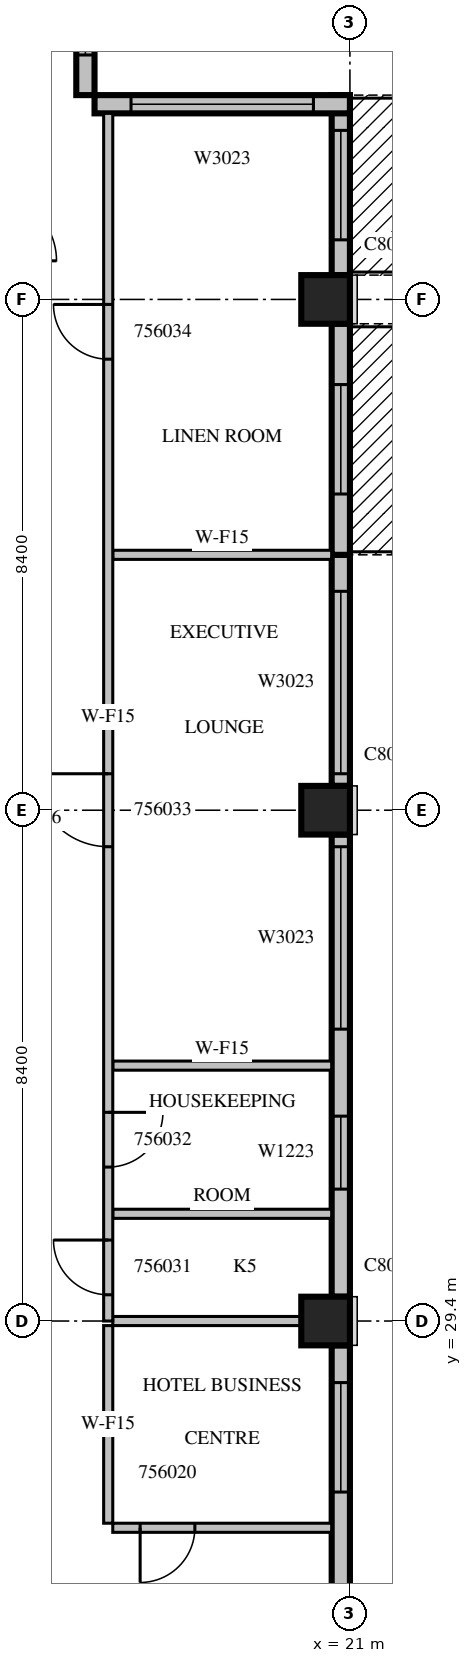
"""IFC4 building model, lengths in metres.
Left out: names, types, materials, properties, quantities, classifications, styles, units other than length and angle.
Written with IfcOpenShell. Run it as: python <this file> out.ifc"""

import sys

from ifc_helpers import new_model, si_unit, direction, frame, frame_2d, origin, origin_2d, place, context, subcontext, project, spatial, rectangle, extrude, source, transform, mapped, element, fill, save


model = new_model("IFC4")
c1 = context("Model", 3, precision=1e-05, world=origin(), true_north=direction((0.0, 1.0)))
c2 = subcontext(c1, "Body", "Model", "MODEL_VIEW")
j1 = project(units=[si_unit("LENGTHUNIT", "METRE"), si_unit("PLANEANGLEUNIT", "RADIAN")], contexts=[c1])
p1 = place(None, origin())
s1 = spatial("IfcSite", under=j1, at=p1, CompositionType="ELEMENT")
p2 = place(p1, origin())
s2 = spatial("IfcBuilding", under=s1, at=p2, CompositionType="ELEMENT")
p3 = place(p2, frame((0.0, 0.0, 246.2)))
s3 = spatial("IfcBuildingStorey", under=s2, at=p3, CompositionType="ELEMENT", Elevation=246.2)
m1 = source(origin(), c2, "Body", "SweptSolid", [
    extrude(rectangle(XDim=0.8, YDim=0.8, at=origin_2d()), origin(), (0.0, 0.0, 1.0), 3.8),
])
for number, where, z_axis, x_axis in (
    (1, (20.6, 29.4, 0.0), (0.0, 0.0, 1.0), (1.0, 0.0, 0.0)),
    (2, (20.6, 37.8, 0.0), (0.0, 0.0, 1.0), (1.0, 0.0, 0.0)),
    (3, (20.6, 46.2, 0.0), (0.0, 0.0, 1.0), (1.0, 0.0, 0.0)),
):
    element("IfcColumn", number, at=place(p3, frame(where, z_axis=z_axis, x_axis=x_axis)), inside=s3, PredefinedType="COLUMN", context=c2, shape_type="MappedRepresentation", body=[
        mapped(m1, transform((0.0, 0.0, 0.0), scale=1.0)),
    ])
m2 = source(origin(), c2, "Body", "SweptSolid", [
    extrude(rectangle(XDim=7.2, YDim=0.3, at=frame_2d((3.6, 0.0))), origin(), (0.0, 0.0, 1.0), 3.4),
])
p4 = place(p3, frame((20.85, 21.8, 0.0), z_axis=(0.0, 0.0, 1.0), x_axis=(0.0, 1.0, 0.0)))
e4 = element("IfcWall", 4, at=p4, inside=s3, PredefinedType="STANDARD", context=c2, shape_type="MappedRepresentation", body=[
    mapped(m2, transform((0.0, 0.0, 0.0), scale=1.0)),
])
m3 = source(origin(), c2, "Body", "SweptSolid", [
    extrude(rectangle(XDim=1.8, YDim=2.3, at=frame_2d((0.9, 1.15))), frame((0.0, 0.16, 0.0), z_axis=(0.0, -1.0, 0.0), x_axis=(1.0, 0.0, 0.0)), (0.0, 0.0, 1.0), 0.32),
])
p5 = place(p4, frame((0.4, 0.0, 0.6)))
e5 = element("IfcOpeningElement", 5, at=p5, cuts=e4, PredefinedType="OPENING", context=c2, shape_type="MappedRepresentation", body=[
    mapped(m3, transform((0.0, 0.0, 0.0), scale=1.0)),
])
p6 = place(p4, frame((4.787, 0.0, 0.6)))
e6 = element("IfcOpeningElement", 6, at=p6, cuts=e4, PredefinedType="OPENING", context=c2, shape_type="MappedRepresentation", body=[
    mapped(m3, transform((0.0, 0.0, 0.0), scale=1.0)),
])
m4 = source(origin(), c2, "Body", "SweptSolid", [
    extrude(rectangle(XDim=7.6, YDim=0.3, at=frame_2d((3.8, 0.0))), origin(), (0.0, 0.0, 1.0), 3.4),
])
p7 = place(p3, frame((20.85, 29.8, 0.0), z_axis=(0.0, 0.0, 1.0), x_axis=(0.0, 1.0, 0.0)))
e7 = element("IfcWall", 7, at=p7, inside=s3, PredefinedType="STANDARD", context=c2, shape_type="MappedRepresentation", body=[
    mapped(m4, transform((0.0, 0.0, 0.0), scale=1.0)),
])
m5 = source(origin(), c2, "Body", "SweptSolid", [
    extrude(rectangle(XDim=1.2, YDim=2.3, at=frame_2d((0.6, 1.15))), frame((0.0, 0.16, 0.0), z_axis=(0.0, -1.0, 0.0), x_axis=(1.0, 0.0, 0.0)), (0.0, 0.0, 1.0), 0.32),
])
p8 = place(p7, frame((1.769, 0.0, 0.6)))
e8 = element("IfcOpeningElement", 8, at=p8, cuts=e7, PredefinedType="OPENING", context=c2, shape_type="MappedRepresentation", body=[
    mapped(m5, transform((0.0, 0.0, 0.0), scale=1.0)),
])
m6 = source(origin(), c2, "Body", "SweptSolid", [
    extrude(rectangle(XDim=3.0, YDim=2.3, at=frame_2d((1.5, 1.15))), frame((0.0, 0.16, 0.0), z_axis=(0.0, -1.0, 0.0), x_axis=(1.0, 0.0, 0.0)), (0.0, 0.0, 1.0), 0.32),
])
p9 = place(p7, frame((4.4, 0.0, 0.6)))
e9 = element("IfcOpeningElement", 9, at=p9, cuts=e7, PredefinedType="OPENING", context=c2, shape_type="MappedRepresentation", body=[
    mapped(m6, transform((0.0, 0.0, 0.0), scale=1.0)),
])
m7 = source(origin(), c2, "Body", "SweptSolid", [
    extrude(rectangle(XDim=3.8, YDim=0.3, at=frame_2d((1.9, 0.0))), origin(), (0.0, 0.0, 1.0), 3.4),
])
p10 = place(p3, frame((20.85, 38.2, 0.0), z_axis=(0.0, 0.0, 1.0), x_axis=(0.0, 1.0, 0.0)))
e10 = element("IfcWall", 10, at=p10, inside=s3, PredefinedType="STANDARD", context=c2, shape_type="MappedRepresentation", body=[
    mapped(m7, transform((0.0, 0.0, 0.0), scale=1.0)),
])
p11 = place(p10, frame((0.2, 0.0, 0.6)))
e11 = element("IfcOpeningElement", 11, at=p11, cuts=e10, PredefinedType="OPENING", context=c2, shape_type="MappedRepresentation", body=[
    mapped(m6, transform((0.0, 0.0, 0.0), scale=1.0)),
])
p12 = place(p3, frame((20.85, 42.0, 0.0), z_axis=(0.0, 0.0, 1.0), x_axis=(0.0, 1.0, 0.0)))
e12 = element("IfcWall", 12, at=p12, inside=s3, PredefinedType="STANDARD", context=c2, shape_type="MappedRepresentation", body=[
    mapped(m7, transform((0.0, 0.0, 0.0), scale=1.0)),
])
m8 = source(origin(), c2, "Body", "SweptSolid", [
    extrude(rectangle(XDim=1.8, YDim=2.4, at=frame_2d((0.9, 1.2))), frame((0.0, 0.16, 0.0), z_axis=(0.0, -1.0, 0.0), x_axis=(1.0, 0.0, 0.0)), (0.0, 0.0, 1.0), 0.32),
])
p13 = place(p12, frame((1.0, 0.0, 0.0)))
e13 = element("IfcOpeningElement", 13, at=p13, cuts=e12, PredefinedType="OPENING", context=c2, shape_type="MappedRepresentation", body=[
    mapped(m8, transform((0.0, 0.0, 0.0), scale=1.0)),
])
m9 = source(origin(), c2, "Body", "SweptSolid", [
    extrude(rectangle(XDim=2.96, YDim=0.3, at=frame_2d((1.48, 0.0))), origin(), (0.0, 0.0, 1.0), 3.4),
])
p14 = place(p3, frame((20.85, 46.6, 0.0), z_axis=(0.0, 0.0, 1.0), x_axis=(0.0, 1.0, 0.0)))
e14 = element("IfcWall", 14, at=p14, inside=s3, PredefinedType="STANDARD", context=c2, shape_type="MappedRepresentation", body=[
    mapped(m9, transform((0.0, 0.0, 0.0), scale=1.0)),
])
p15 = place(p14, frame((0.58, 0.0, 0.0)))
e15 = element("IfcOpeningElement", 15, at=p15, cuts=e14, PredefinedType="OPENING", context=c2, shape_type="MappedRepresentation", body=[
    mapped(m8, transform((0.0, 0.0, 0.0), scale=1.0)),
])
m10 = source(origin(), c2, "Body", "SweptSolid", [
    extrude(rectangle(XDim=4.2, YDim=0.3, at=frame_2d((2.1, 0.0))), origin(), (0.0, 0.0, 1.0), 3.4),
])
p16 = place(p3, frame((21.0, 49.41, 0.0), z_axis=(0.0, 0.0, 1.0), x_axis=(-1.0, 0.0, 0.0)))
e16 = element("IfcWall", 16, at=p16, inside=s3, PredefinedType="STANDARD", context=c2, shape_type="MappedRepresentation", body=[
    mapped(m10, transform((0.0, 0.0, 0.0), scale=1.0)),
])
p17 = place(p16, frame((0.6, 0.0, 0.6)))
e17 = element("IfcOpeningElement", 17, at=p17, cuts=e16, PredefinedType="OPENING", context=c2, shape_type="MappedRepresentation", body=[
    mapped(m6, transform((0.0, 0.0, 0.0), scale=1.0)),
])
m11 = source(origin(), c2, "Body", "SweptSolid", [
    extrude(rectangle(XDim=2.52, YDim=0.3, at=frame_2d((1.26, 0.0))), origin(), (0.0, 0.0, 1.0), 3.4),
])
p18 = place(p3, frame((16.65, 49.56, 0.0), z_axis=(0.0, 0.0, 1.0), x_axis=(0.0, 1.0, 0.0)))
e18 = element("IfcWall", 18, at=p18, inside=s3, PredefinedType="STANDARD", context=c2, shape_type="MappedRepresentation", body=[
    mapped(m11, transform((0.0, 0.0, 0.0), scale=1.0)),
])
p19 = place(p18, frame((0.66, 0.0, 0.6)))
e19 = element("IfcOpeningElement", 19, at=p19, cuts=e18, PredefinedType="OPENING", context=c2, shape_type="MappedRepresentation", body=[
    mapped(m5, transform((0.0, 0.0, 0.0), scale=1.0)),
])
m12 = source(origin(), c2, "Body", "SweptSolid", [
    extrude(rectangle(XDim=3.6, YDim=0.15, at=frame_2d((1.8, 0.0))), origin(), (0.0, 0.0, 1.0), 3.4),
])
p20 = place(p3, frame((17.1, 26.0, 0.0), z_axis=(0.0, 0.0, 1.0), x_axis=(1.0, 0.0, 0.0)))
e20 = element("IfcWall", 20, at=p20, inside=s3, PredefinedType="PARTITIONING", context=c2, shape_type="MappedRepresentation", body=[
    mapped(m12, transform((0.0, 0.0, 0.0), scale=1.0)),
])
m13 = source(origin(), c2, "Body", "SweptSolid", [
    extrude(rectangle(XDim=0.9, YDim=2.1, at=frame_2d((0.45, 1.05))), frame((0.0, 0.085, 0.0), z_axis=(0.0, -1.0, 0.0), x_axis=(1.0, 0.0, 0.0)), (0.0, 0.0, 1.0), 0.17),
])
p21 = place(p20, frame((0.45, 0.0, 0.0)))
e21 = element("IfcOpeningElement", 21, at=p21, cuts=e20, PredefinedType="OPENING", context=c2, shape_type="MappedRepresentation", body=[
    mapped(m13, transform((0.0, 0.0, 0.0), scale=1.0)),
])
m14 = source(origin(), c2, "Body", "SweptSolid", [
    extrude(rectangle(XDim=3.25, YDim=0.15, at=frame_2d((1.625, 0.0))), origin(), (0.0, 0.0, 1.0), 3.4),
])
p22 = place(p3, frame((17.025, 29.325, 0.0), z_axis=(0.0, 0.0, 1.0), x_axis=(0.0, -1.0, 0.0)))
e22 = element("IfcWall", 22, at=p22, inside=s3, PredefinedType="PARTITIONING", context=c2, shape_type="MappedRepresentation", body=[
    mapped(m14, transform((0.0, 0.0, 0.0), scale=1.0)),
])
m15 = source(origin(), c2, "Body", "SweptSolid", [
    extrude(rectangle(XDim=3.101, YDim=0.15, at=frame_2d((1.55, 0.0))), origin(), (0.0, 0.0, 1.0), 3.4),
])
p23 = place(p3, frame((20.201, 29.4, 0.0), z_axis=(0.0, 0.0, 1.0), x_axis=(-1.0, 0.0, 0.0)))
e23 = element("IfcWall", 23, at=p23, inside=s3, PredefinedType="PARTITIONING", context=c2, shape_type="MappedRepresentation", body=[
    mapped(m15, transform((0.0, 0.0, 0.0), scale=1.0)),
])
for number, where, z_axis, x_axis in (
    (24, (17.1, 31.163, 0.0), (0.0, 0.0, 1.0), (1.0, 0.0, 0.0)),
    (25, (20.7, 33.6, 0.0), (0.0, 0.0, 1.0), (-1.0, 0.0, 0.0)),
    (26, (20.7, 42.0, 0.0), (0.0, 0.0, 1.0), (-1.0, 0.0, 0.0)),
):
    element("IfcWall", number, at=place(p3, frame(where, z_axis=z_axis, x_axis=x_axis)), inside=s3, PredefinedType="PARTITIONING", context=c2, shape_type="MappedRepresentation", body=[
        mapped(m12, transform((0.0, 0.0, 0.0), scale=1.0)),
    ])
m16 = source(origin(), c2, "Body", "SweptSolid", [
    extrude(rectangle(XDim=19.86, YDim=0.15, at=frame_2d((9.93, 0.0))), origin(), (0.0, 0.0, 1.0), 3.4),
])
p24 = place(p3, frame((17.025, 49.26, 0.0), z_axis=(0.0, 0.0, 1.0), x_axis=(0.0, -1.0, 0.0)))
e27 = element("IfcWall", 27, at=p24, inside=s3, PredefinedType="PARTITIONING", context=c2, shape_type="MappedRepresentation", body=[
    mapped(m16, transform((0.0, 0.0, 0.0), scale=1.0)),
])
p25 = place(p24, frame((18.528, 0.0, 0.0)))
e28 = element("IfcOpeningElement", 28, at=p25, cuts=e27, PredefinedType="OPENING", context=c2, shape_type="MappedRepresentation", body=[
    mapped(m13, transform((0.0, 0.0, 0.0), scale=1.0)),
])
p26 = place(p24, frame((16.428, 0.0, 0.0)))
e29 = element("IfcOpeningElement", 29, at=p26, cuts=e27, PredefinedType="OPENING", context=c2, shape_type="MappedRepresentation", body=[
    mapped(m13, transform((0.0, 0.0, 0.0), scale=1.0)),
])
m17 = source(origin(), c2, "Body", "SweptSolid", [
    extrude(rectangle(XDim=1.2, YDim=2.1, at=frame_2d((0.6, 1.05))), frame((0.0, 0.085, 0.0), z_axis=(0.0, -1.0, 0.0), x_axis=(1.0, 0.0, 0.0)), (0.0, 0.0, 1.0), 0.17),
])
p27 = place(p24, frame((10.86, 0.0, 0.0)))
e30 = element("IfcOpeningElement", 30, at=p27, cuts=e27, PredefinedType="OPENING", context=c2, shape_type="MappedRepresentation", body=[
    mapped(m17, transform((0.0, 0.0, 0.0), scale=1.0)),
])
p28 = place(p24, frame((3.143, 0.0, 0.0)))
e31 = element("IfcOpeningElement", 31, at=p28, cuts=e27, PredefinedType="OPENING", context=c2, shape_type="MappedRepresentation", body=[
    mapped(m13, transform((0.0, 0.0, 0.0), scale=1.0)),
])
m18 = source(origin(), c2, "Body", "SweptSolid", [
    extrude(rectangle(XDim=1.8, YDim=2.3, at=frame_2d((0.9, 1.15))), frame((0.0, 0.03, 0.0), z_axis=(0.0, -1.0, 0.0), x_axis=(1.0, 0.0, 0.0)), (0.0, 0.0, 1.0), 0.06),
])
p29 = place(p6, origin())
e32 = element("IfcWindow", 32, at=p29, inside=s3, PartitioningType="SINGLE_PANEL", PredefinedType="WINDOW", context=c2, shape_type="MappedRepresentation", body=[
    mapped(m18, transform((0.0, 0.0, 0.0), scale=1.0)),
])
fill(e6, e32)
m19 = source(origin(), c2, "Body", "SweptSolid", [
    extrude(rectangle(XDim=1.2, YDim=2.3, at=frame_2d((0.6, 1.15))), frame((0.0, 0.03, 0.0), z_axis=(0.0, -1.0, 0.0), x_axis=(1.0, 0.0, 0.0)), (0.0, 0.0, 1.0), 0.06),
])
p30 = place(p8, origin())
e33 = element("IfcWindow", 33, at=p30, inside=s3, PartitioningType="SINGLE_PANEL", PredefinedType="WINDOW", context=c2, shape_type="MappedRepresentation", body=[
    mapped(m19, transform((0.0, 0.0, 0.0), scale=1.0)),
])
fill(e8, e33)
m20 = source(origin(), c2, "Body", "SweptSolid", [
    extrude(rectangle(XDim=3.0, YDim=2.3, at=frame_2d((1.5, 1.15))), frame((0.0, 0.03, 0.0), z_axis=(0.0, -1.0, 0.0), x_axis=(1.0, 0.0, 0.0)), (0.0, 0.0, 1.0), 0.06),
])
p31 = place(p9, origin())
e34 = element("IfcWindow", 34, at=p31, inside=s3, PartitioningType="SINGLE_PANEL", PredefinedType="WINDOW", context=c2, shape_type="MappedRepresentation", body=[
    mapped(m20, transform((0.0, 0.0, 0.0), scale=1.0)),
])
fill(e9, e34)
p32 = place(p11, origin())
e35 = element("IfcWindow", 35, at=p32, inside=s3, PartitioningType="SINGLE_PANEL", PredefinedType="WINDOW", context=c2, shape_type="MappedRepresentation", body=[
    mapped(m20, transform((0.0, 0.0, 0.0), scale=1.0)),
])
fill(e11, e35)
m21 = source(origin(), c2, "Body", "SweptSolid", [
    extrude(rectangle(XDim=1.8, YDim=2.4, at=frame_2d((0.9, 1.2))), frame((0.0, 0.025, 0.0), z_axis=(0.0, -1.0, 0.0), x_axis=(1.0, 0.0, 0.0)), (0.0, 0.0, 1.0), 0.05),
])
p33 = place(p13, origin())
e36 = element("IfcDoor", 36, at=p33, inside=s3, OperationType="SLIDING_TO_LEFT", PredefinedType="DOOR", context=c2, shape_type="MappedRepresentation", body=[
    mapped(m21, transform((0.0, 0.0, 0.0), scale=1.0)),
])
fill(e13, e36)
p34 = place(p15, origin())
e37 = element("IfcDoor", 37, at=p34, inside=s3, OperationType="SLIDING_TO_LEFT", PredefinedType="DOOR", context=c2, shape_type="MappedRepresentation", body=[
    mapped(m21, transform((0.0, 0.0, 0.0), scale=1.0)),
])
fill(e15, e37)
p35 = place(p17, origin())
e38 = element("IfcWindow", 38, at=p35, inside=s3, PartitioningType="SINGLE_PANEL", PredefinedType="WINDOW", context=c2, shape_type="MappedRepresentation", body=[
    mapped(m20, transform((0.0, 0.0, 0.0), scale=1.0)),
])
fill(e17, e38)
p36 = place(p19, origin())
e39 = element("IfcWindow", 39, at=p36, inside=s3, PartitioningType="SINGLE_PANEL", PredefinedType="WINDOW", context=c2, shape_type="MappedRepresentation", body=[
    mapped(m19, transform((0.0, 0.0, 0.0), scale=1.0)),
])
fill(e19, e39)
m22 = source(origin(), c2, "Body", "SweptSolid", [
    extrude(rectangle(XDim=0.9, YDim=2.1, at=frame_2d((0.45, 1.05))), frame((0.0, 0.025, 0.0), z_axis=(0.0, -1.0, 0.0), x_axis=(1.0, 0.0, 0.0)), (0.0, 0.0, 1.0), 0.05),
])
p37 = place(p21, origin())
e40 = element("IfcDoor", 40, at=p37, inside=s3, OperationType="SINGLE_SWING_RIGHT", PredefinedType="DOOR", context=c2, shape_type="MappedRepresentation", body=[
    mapped(m22, transform((0.0, 0.0, 0.0), scale=1.0)),
])
fill(e21, e40)
p38 = place(p25, origin())
e41 = element("IfcDoor", 41, at=p38, inside=s3, OperationType="SINGLE_SWING_RIGHT", PredefinedType="DOOR", context=c2, shape_type="MappedRepresentation", body=[
    mapped(m22, transform((0.0, 0.0, 0.0), scale=1.0)),
])
fill(e28, e41)
p39 = place(p26, origin())
e42 = element("IfcDoor", 42, at=p39, inside=s3, OperationType="SINGLE_SWING_LEFT", PredefinedType="DOOR", context=c2, shape_type="MappedRepresentation", body=[
    mapped(m22, transform((0.0, 0.0, 0.0), scale=1.0)),
])
fill(e29, e42)
m23 = source(origin(), c2, "Body", "SweptSolid", [
    extrude(rectangle(XDim=1.2, YDim=2.1, at=frame_2d((0.6, 1.05))), frame((0.0, 0.025, 0.0), z_axis=(0.0, -1.0, 0.0), x_axis=(1.0, 0.0, 0.0)), (0.0, 0.0, 1.0), 0.05),
])
p40 = place(p27, origin())
e43 = element("IfcDoor", 43, at=p40, inside=s3, OperationType="SINGLE_SWING_RIGHT", PredefinedType="DOOR", context=c2, shape_type="MappedRepresentation", body=[
    mapped(m23, transform((0.0, 0.0, 0.0), scale=1.0)),
])
fill(e30, e43)
p41 = place(p28, origin())
e44 = element("IfcDoor", 44, at=p41, inside=s3, OperationType="SINGLE_SWING_RIGHT", PredefinedType="DOOR", context=c2, shape_type="MappedRepresentation", body=[
    mapped(m22, transform((0.0, 0.0, 0.0), scale=1.0)),
])
fill(e31, e44)
save(model, sys.argv[1])
